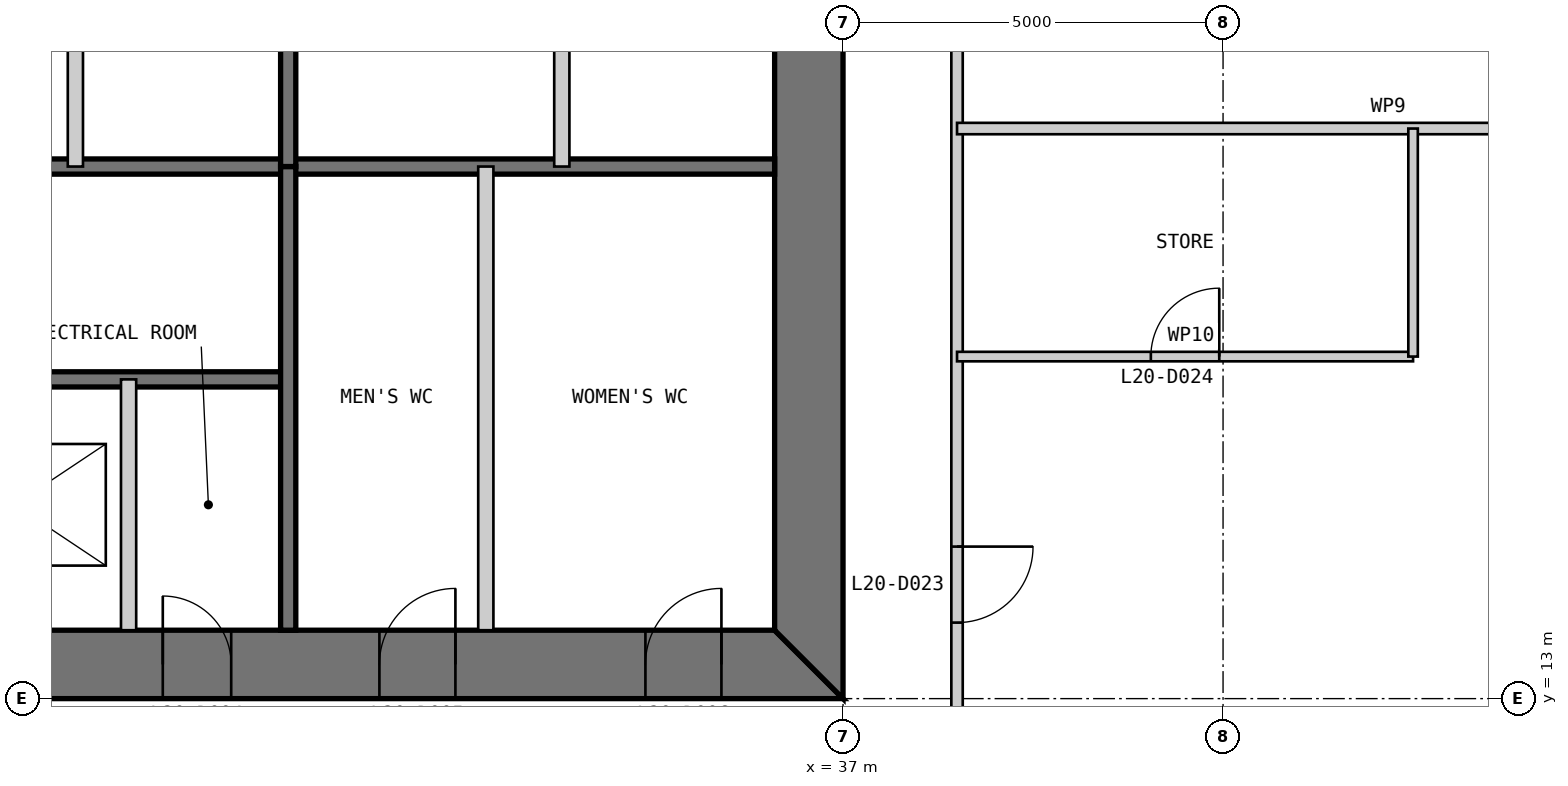
"""IFC4 building model, lengths in metres.
Left out: names, types, materials, properties, quantities, classifications, styles, units other than length and angle.
Written with IfcOpenShell. Run it as: python <this file> out.ifc"""

import sys

from ifc_helpers import new_model, si_unit, direction, frame, frame_2d, origin, place, context, subcontext, project, spatial, polyline, rectangle, outline, extrude, element, fill, save


model = new_model("IFC4")
c1 = context("Model", 3, precision=1e-05, world=origin(), true_north=direction((0.0, 1.0)))
c2 = subcontext(c1, "Body", "Model", "MODEL_VIEW")
j1 = project(units=[si_unit("LENGTHUNIT", "METRE"), si_unit("PLANEANGLEUNIT", "RADIAN")], contexts=[c1])
p1 = place(None, origin())
s1 = spatial("IfcSite", under=j1, at=p1, CompositionType="ELEMENT")
p2 = place(p1, origin())
s2 = spatial("IfcBuilding", under=s1, at=p2, CompositionType="ELEMENT")
p3 = place(p2, frame((0.0, 0.0, 87.0)))
s3 = spatial("IfcBuildingStorey", under=s2, at=p3, CompositionType="ELEMENT", Elevation=87.0)
p4 = place(p3, frame((13.0, 13.45, 0.0), z_axis=(0.0, 0.0, 1.0), x_axis=(1.0, 0.0, 0.0)))
e1 = element("IfcWall", 1, at=p4, inside=s3, PredefinedType="SHEAR", context=c2, shape_type="SweptSolid", body=[
    extrude(outline(polyline([(0.0, -0.45), (24.0, -0.45), (23.1, 0.45), (0.9, 0.45), (0.0, -0.45)])), origin(), (0.0, 0.0, 1.0), 4.0),
])
p5 = place(p4, frame((4.9, 0.0, 0.0)))
e2 = element("IfcOpeningElement", 2, at=p5, cuts=e1, PredefinedType="OPENING", context=c2, shape_type="SweptSolid", body=[
    extrude(rectangle(XDim=1.0, YDim=2.2, at=frame_2d((0.5, 1.1))), frame((0.0, 0.46, 0.0), z_axis=(0.0, -1.0, 0.0), x_axis=(1.0, 0.0, 0.0)), (0.0, 0.0, 1.0), 0.92),
])
p6 = place(p4, frame((8.9, 0.0, 0.0)))
e3 = element("IfcOpeningElement", 3, at=p6, cuts=e1, PredefinedType="OPENING", context=c2, shape_type="SweptSolid", body=[
    extrude(rectangle(XDim=1.1, YDim=2.2, at=frame_2d((0.55, 1.1))), frame((0.0, 0.46, 0.0), z_axis=(0.0, -1.0, 0.0), x_axis=(1.0, 0.0, 0.0)), (0.0, 0.0, 1.0), 0.92),
])
p7 = place(p4, frame((15.05, 0.0, 0.0)))
e4 = element("IfcOpeningElement", 4, at=p7, cuts=e1, PredefinedType="OPENING", context=c2, shape_type="SweptSolid", body=[
    extrude(rectangle(XDim=0.9, YDim=2.2, at=frame_2d((0.45, 1.1))), frame((0.0, 0.46, 0.0), z_axis=(0.0, -1.0, 0.0), x_axis=(1.0, 0.0, 0.0)), (0.0, 0.0, 1.0), 0.92),
])
p8 = place(p4, frame((17.9, 0.0, 0.0)))
e5 = element("IfcOpeningElement", 5, at=p8, cuts=e1, PredefinedType="OPENING", context=c2, shape_type="SweptSolid", body=[
    extrude(rectangle(XDim=1.0, YDim=2.2, at=frame_2d((0.5, 1.1))), frame((0.0, 0.46, 0.0), z_axis=(0.0, -1.0, 0.0), x_axis=(1.0, 0.0, 0.0)), (0.0, 0.0, 1.0), 0.92),
])
p9 = place(p4, frame((21.4, 0.0, 0.0)))
e6 = element("IfcOpeningElement", 6, at=p9, cuts=e1, PredefinedType="OPENING", context=c2, shape_type="SweptSolid", body=[
    extrude(rectangle(XDim=1.0, YDim=2.2, at=frame_2d((0.5, 1.1))), frame((0.0, 0.46, 0.0), z_axis=(0.0, -1.0, 0.0), x_axis=(1.0, 0.0, 0.0)), (0.0, 0.0, 1.0), 0.92),
])
p10 = place(p3, frame((36.55, 13.9, 0.0), z_axis=(0.0, 0.0, 1.0), x_axis=(0.0, 1.0, 0.0)))
e7 = element("IfcWall", 7, at=p10, inside=s3, PredefinedType="SHEAR", context=c2, shape_type="SweptSolid", body=[
    extrude(outline(polyline([(-0.9, -0.45), (23.1, -0.45), (22.2, 0.45), (0.0, 0.45), (-0.9, -0.45)])), origin(), (0.0, 0.0, 1.0), 4.0),
])
p11 = place(p10, frame((20.2, 0.0, 0.0)))
e8 = element("IfcOpeningElement", 8, at=p11, cuts=e7, PredefinedType="OPENING", context=c2, shape_type="SweptSolid", body=[
    extrude(rectangle(XDim=1.0, YDim=2.2, at=frame_2d((0.5, 1.1))), frame((0.0, 0.46, 0.0), z_axis=(0.0, -1.0, 0.0), x_axis=(1.0, 0.0, 0.0)), (0.0, 0.0, 1.0), 0.92),
])
p12 = place(p10, frame((17.25, 0.0, 0.0)))
e9 = element("IfcOpeningElement", 9, at=p12, cuts=e7, PredefinedType="OPENING", context=c2, shape_type="SweptSolid", body=[
    extrude(rectangle(XDim=0.9, YDim=2.2, at=frame_2d((0.45, 1.1))), frame((0.0, 0.46, 0.0), z_axis=(0.0, -1.0, 0.0), x_axis=(1.0, 0.0, 0.0)), (0.0, 0.0, 1.0), 0.92),
])
p13 = place(p3, frame((20.3, 17.2, 0.0), z_axis=(0.0, 0.0, 1.0), x_axis=(1.0, 0.0, 0.0)))
e10 = element("IfcWall", 10, at=p13, inside=s3, PredefinedType="SOLIDWALL", context=c2, shape_type="SweptSolid", body=[
    extrude(rectangle(XDim=9.4, YDim=0.2, at=frame_2d((4.7, 0.0))), origin(), (0.0, 0.0, 1.0), 3.8),
])
p14 = place(p13, frame((0.25, 0.0, 0.0)))
e11 = element("IfcOpeningElement", 11, at=p14, cuts=e10, PredefinedType="OPENING", context=c2, shape_type="SweptSolid", body=[
    extrude(rectangle(XDim=1.0, YDim=2.2, at=frame_2d((0.5, 1.1))), frame((0.0, 0.11, 0.0), z_axis=(0.0, -1.0, 0.0), x_axis=(1.0, 0.0, 0.0)), (0.0, 0.0, 1.0), 0.22),
])
p15 = place(p3, frame((20.3, 20.0, 0.0), z_axis=(0.0, 0.0, 1.0), x_axis=(1.0, 0.0, 0.0)))
e12 = element("IfcWall", 12, at=p15, inside=s3, PredefinedType="SOLIDWALL", context=c2, shape_type="SweptSolid", body=[
    extrude(rectangle(XDim=15.8, YDim=0.2, at=frame_2d((7.9, 0.0))), origin(), (0.0, 0.0, 1.0), 3.8),
])
p16 = place(p3, frame((27.6, 13.9, 0.0), z_axis=(0.0, 0.0, 1.0), x_axis=(0.0, 1.0, 0.0)))
e13 = element("IfcWall", 13, at=p16, inside=s3, PredefinedType="PARTITIONING", context=c2, shape_type="SweptSolid", body=[
    extrude(rectangle(XDim=3.3, YDim=0.2, at=frame_2d((1.65, 0.0))), origin(), (0.0, 0.0, 1.0), 3.8),
])
p17 = place(p3, frame((29.7, 13.9, 0.0), z_axis=(0.0, 0.0, 1.0), x_axis=(0.0, 1.0, 0.0)))
e14 = element("IfcWall", 14, at=p17, inside=s3, PredefinedType="SOLIDWALL", context=c2, shape_type="SweptSolid", body=[
    extrude(rectangle(XDim=6.1, YDim=0.2, at=frame_2d((3.05, 0.0))), origin(), (0.0, 0.0, 1.0), 3.8),
])
p18 = place(p3, frame((32.3, 13.9, 0.0), z_axis=(0.0, 0.0, 1.0), x_axis=(0.0, 1.0, 0.0)))
e15 = element("IfcWall", 15, at=p18, inside=s3, PredefinedType="PARTITIONING", context=c2, shape_type="SweptSolid", body=[
    extrude(rectangle(XDim=6.1, YDim=0.2, at=frame_2d((3.05, 0.0))), origin(), (0.0, 0.0, 1.0), 3.8),
])
p19 = place(p3, frame((33.3, 36.1, 0.0), z_axis=(0.0, 0.0, 1.0), x_axis=(0.0, -1.0, 0.0)))
e16 = element("IfcWall", 16, at=p19, inside=s3, PredefinedType="PARTITIONING", context=c2, shape_type="SweptSolid", body=[
    extrude(rectangle(XDim=16.1, YDim=0.2, at=frame_2d((8.05, 0.0))), origin(), (0.0, 0.0, 1.0), 3.8),
])
p20 = place(p3, frame((29.7, 36.1, 0.0), z_axis=(0.0, 0.0, 1.0), x_axis=(0.0, -1.0, 0.0)))
e17 = element("IfcWall", 17, at=p20, inside=s3, PredefinedType="SOLIDWALL", context=c2, shape_type="SweptSolid", body=[
    extrude(rectangle(XDim=16.1, YDim=0.2, at=frame_2d((8.05, 0.0))), origin(), (0.0, 0.0, 1.0), 3.8),
])
p21 = place(p3, frame((26.9, 30.0, 0.0), z_axis=(0.0, 0.0, 1.0), x_axis=(0.0, -1.0, 0.0)))
e18 = element("IfcWall", 18, at=p21, inside=s3, PredefinedType="PARTITIONING", context=c2, shape_type="SweptSolid", body=[
    extrude(rectangle(XDim=10.0, YDim=0.2, at=frame_2d((5.0, 0.0))), origin(), (0.0, 0.0, 1.0), 3.8),
])
p22 = place(p3, frame((38.5, 11.5, 0.0), z_axis=(0.0, 0.0, 1.0), x_axis=(0.0, 1.0, 0.0)))
e19 = element("IfcWall", 19, at=p22, inside=s3, PredefinedType="PARTITIONING", context=c2, shape_type="SweptSolid", body=[
    extrude(rectangle(XDim=27.0, YDim=0.15, at=frame_2d((13.5, 0.0))), origin(), (0.0, 0.0, 1.0), 3.8),
])
p23 = place(p22, frame((2.5, 0.0, 0.0)))
e20 = element("IfcOpeningElement", 20, at=p23, cuts=e19, PredefinedType="OPENING", context=c2, shape_type="SweptSolid", body=[
    extrude(rectangle(XDim=1.0, YDim=2.2, at=frame_2d((0.5, 1.1))), frame((0.0, 0.085, 0.0), z_axis=(0.0, -1.0, 0.0), x_axis=(1.0, 0.0, 0.0)), (0.0, 0.0, 1.0), 0.17),
])
p24 = place(p22, frame((16.0, 0.0, 0.0)))
e21 = element("IfcOpeningElement", 21, at=p24, cuts=e19, PredefinedType="OPENING", context=c2, shape_type="SweptSolid", body=[
    extrude(rectangle(XDim=1.0, YDim=2.2, at=frame_2d((0.5, 1.1))), frame((0.0, 0.085, 0.0), z_axis=(0.0, -1.0, 0.0), x_axis=(1.0, 0.0, 0.0)), (0.0, 0.0, 1.0), 0.17),
])
p25 = place(p3, frame((44.5, 17.5, 0.0), z_axis=(0.0, 0.0, 1.0), x_axis=(-1.0, 0.0, 0.0)))
e22 = element("IfcWall", 22, at=p25, inside=s3, PredefinedType="PARTITIONING", context=c2, shape_type="SweptSolid", body=[
    extrude(rectangle(XDim=6.0, YDim=0.125, at=frame_2d((3.0, 0.0))), origin(), (0.0, 0.0, 1.0), 3.8),
])
p26 = place(p25, frame((2.55, 0.0, 0.0)))
e23 = element("IfcOpeningElement", 23, at=p26, cuts=e22, PredefinedType="OPENING", context=c2, shape_type="SweptSolid", body=[
    extrude(rectangle(XDim=0.9, YDim=2.2, at=frame_2d((0.45, 1.1))), frame((0.0, 0.073, 0.0), z_axis=(0.0, -1.0, 0.0), x_axis=(1.0, 0.0, 0.0)), (0.0, 0.0, 1.0), 0.145),
])
p27 = place(p3, frame((49.85, 20.5, 0.0), z_axis=(0.0, 0.0, 1.0), x_axis=(-1.0, 0.0, 0.0)))
e24 = element("IfcWall", 24, at=p27, inside=s3, PredefinedType="PARTITIONING", context=c2, shape_type="SweptSolid", body=[
    extrude(rectangle(XDim=11.35, YDim=0.15, at=frame_2d((5.675, 0.0))), origin(), (0.0, 0.0, 1.0), 3.8),
])
p28 = place(p3, frame((44.5, 17.5, 0.0), z_axis=(0.0, 0.0, 1.0), x_axis=(0.0, 1.0, 0.0)))
e25 = element("IfcWall", 25, at=p28, inside=s3, PredefinedType="PARTITIONING", context=c2, shape_type="SweptSolid", body=[
    extrude(rectangle(XDim=3.0, YDim=0.125, at=frame_2d((1.5, 0.0))), origin(), (0.0, 0.0, 1.0), 3.8),
])
p29 = place(p7, origin())
e26 = element("IfcDoor", 26, at=p29, inside=s3, OperationType="SINGLE_SWING_LEFT", PredefinedType="DOOR", context=c2, shape_type="SweptSolid", body=[
    extrude(rectangle(XDim=0.9, YDim=2.2, at=frame_2d((0.45, 1.1))), frame((0.0, 0.025, 0.0), z_axis=(0.0, -1.0, 0.0), x_axis=(1.0, 0.0, 0.0)), (0.0, 0.0, 1.0), 0.05),
    extrude(outline(polyline([(0.0, 0.0), (0.04, 0.0), (0.04, 2.16), (0.86, 2.16), (0.86, 0.0), (0.9, 0.0), (0.9, 2.2), (0.0, 2.2), (0.0, 0.0)])), frame((0.0, 0.3, 0.0), z_axis=(0.0, -1.0, 0.0), x_axis=(1.0, 0.0, 0.0)), (0.0, 0.0, 1.0), 0.6),
])
fill(e4, e26)
p30 = place(p8, origin())
e27 = element("IfcDoor", 27, at=p30, inside=s3, OperationType="SINGLE_SWING_RIGHT", PredefinedType="DOOR", context=c2, shape_type="SweptSolid", body=[
    extrude(rectangle(XDim=1.0, YDim=2.2, at=frame_2d((0.5, 1.1))), frame((0.0, 0.025, 0.0), z_axis=(0.0, -1.0, 0.0), x_axis=(1.0, 0.0, 0.0)), (0.0, 0.0, 1.0), 0.05),
    extrude(outline(polyline([(0.0, 0.0), (0.04, 0.0), (0.04, 2.16), (0.96, 2.16), (0.96, 0.0), (1.0, 0.0), (1.0, 2.2), (0.0, 2.2), (0.0, 0.0)])), frame((0.0, 0.3, 0.0), z_axis=(0.0, -1.0, 0.0), x_axis=(1.0, 0.0, 0.0)), (0.0, 0.0, 1.0), 0.6),
])
fill(e5, e27)
p31 = place(p9, origin())
e28 = element("IfcDoor", 28, at=p31, inside=s3, OperationType="SINGLE_SWING_RIGHT", PredefinedType="DOOR", context=c2, shape_type="SweptSolid", body=[
    extrude(rectangle(XDim=1.0, YDim=2.2, at=frame_2d((0.5, 1.1))), frame((0.0, 0.025, 0.0), z_axis=(0.0, -1.0, 0.0), x_axis=(1.0, 0.0, 0.0)), (0.0, 0.0, 1.0), 0.05),
    extrude(outline(polyline([(0.0, 0.0), (0.04, 0.0), (0.04, 2.16), (0.96, 2.16), (0.96, 0.0), (1.0, 0.0), (1.0, 2.2), (0.0, 2.2), (0.0, 0.0)])), frame((0.0, 0.3, 0.0), z_axis=(0.0, -1.0, 0.0), x_axis=(1.0, 0.0, 0.0)), (0.0, 0.0, 1.0), 0.6),
])
fill(e6, e28)
p32 = place(p23, frame((1.0, 0.0, 0.0), z_axis=(0.0, 0.0, 1.0), x_axis=(-1.0, 0.0, 0.0)))
e29 = element("IfcDoor", 29, at=p32, inside=s3, OperationType="SINGLE_SWING_LEFT", PredefinedType="DOOR", context=c2, shape_type="SweptSolid", body=[
    extrude(rectangle(XDim=1.0, YDim=2.2, at=frame_2d((0.5, 1.1))), frame((0.0, 0.025, 0.0), z_axis=(0.0, -1.0, 0.0), x_axis=(1.0, 0.0, 0.0)), (0.0, 0.0, 1.0), 0.05),
])
fill(e20, e29)
p33 = place(p26, frame((0.9, 0.0, 0.0), z_axis=(0.0, 0.0, 1.0), x_axis=(-1.0, 0.0, 0.0)))
e30 = element("IfcDoor", 30, at=p33, inside=s3, OperationType="SINGLE_SWING_RIGHT", PredefinedType="DOOR", context=c2, shape_type="SweptSolid", body=[
    extrude(rectangle(XDim=0.9, YDim=2.2, at=frame_2d((0.45, 1.1))), frame((0.0, 0.025, 0.0), z_axis=(0.0, -1.0, 0.0), x_axis=(1.0, 0.0, 0.0)), (0.0, 0.0, 1.0), 0.05),
])
fill(e23, e30)
save(model, sys.argv[1])
